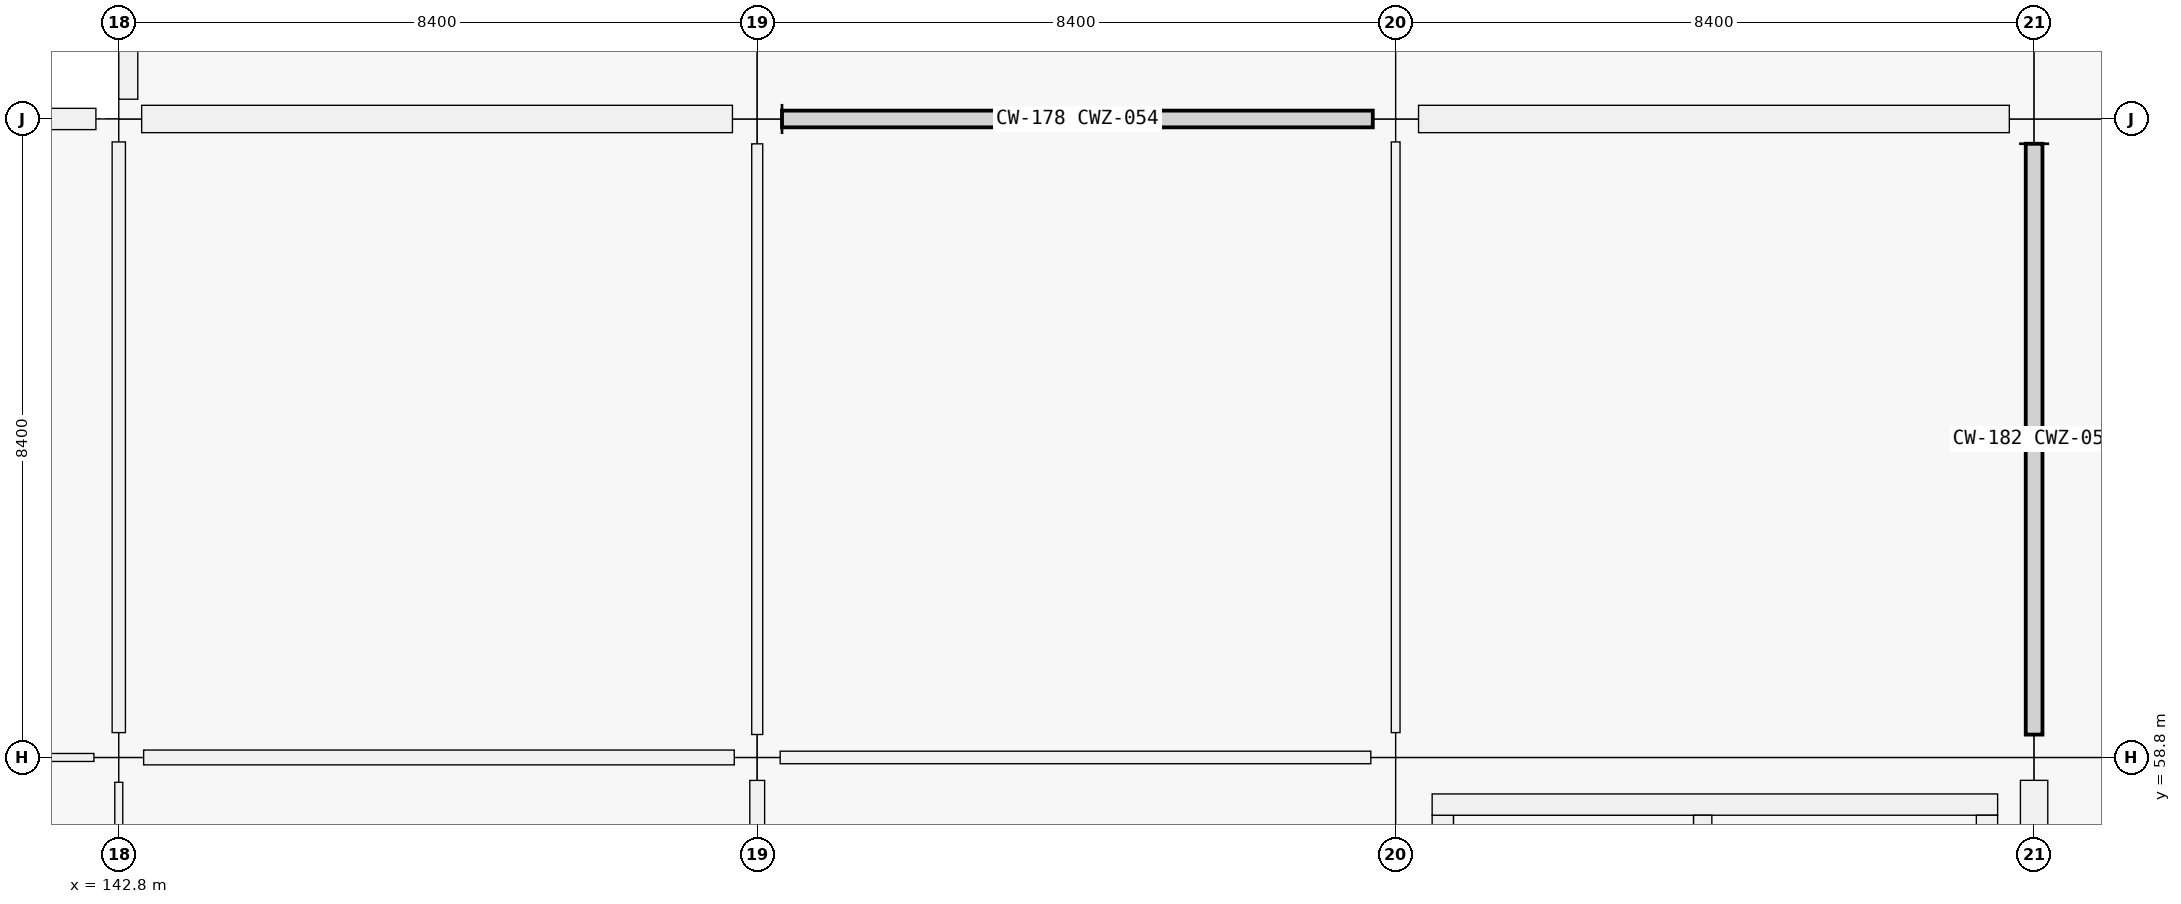
"""IFC4 building model, lengths in metres.
Left out: names, types, materials, properties, quantities, classifications, styles, units other than length and angle.
Written with IfcOpenShell. Run it as: python <this file> out.ifc"""

import sys

from ifc_helpers import new_model, si_unit, direction, frame, frame_2d, origin, origin_2d, place, context, subcontext, project, spatial, rectangle, extrude, element, fill, save


model = new_model("IFC4")
c1 = context("Model", 3, precision=1e-05, world=origin(), true_north=direction((0.0, 1.0)))
c2 = subcontext(c1, "Body", "Model", "MODEL_VIEW")
j1 = project(units=[si_unit("LENGTHUNIT", "METRE"), si_unit("PLANEANGLEUNIT", "RADIAN")], contexts=[c1])
p1 = place(None, origin())
s1 = spatial("IfcSite", under=j1, at=p1, CompositionType="ELEMENT")
p2 = place(p1, origin())
s2 = spatial("IfcBuilding", under=s1, at=p2, CompositionType="ELEMENT")
p3 = place(p2, frame((0.0, 0.0, 10.26)))
s3 = spatial("IfcBuildingStorey", under=s2, at=p3, CompositionType="ELEMENT", Elevation=10.26)
p4 = place(p3, frame((142.8, 58.8, 0.0), z_axis=(0.0, 0.0, 1.0), x_axis=(1.0, 0.0, 0.0)))
e1 = element("IfcColumn", 1, at=p4, inside=s3, PredefinedType="COLUMN", context=c2, shape_type="SweptSolid", body=[
    extrude(rectangle(XDim=0.65, YDim=0.65, at=origin_2d()), origin(), (0.0, 0.0, 1.0), 4.5),
])
for number, where, z_axis, x_axis in (
    (2, (142.8, 67.2, 0.0), (0.0, 0.0, 1.0), (1.0, 0.0, 0.0)),
    (3, (151.2, 58.8, 0.0), (0.0, 0.0, 1.0), (1.0, 0.0, 0.0)),
):
    element("IfcColumn", number, at=place(p3, frame(where, z_axis=z_axis, x_axis=x_axis)), inside=s3, PredefinedType="COLUMN", context=c2, shape_type="SweptSolid", body=[
        extrude(rectangle(XDim=0.6, YDim=0.6, at=origin_2d()), origin(), (0.0, 0.0, 1.0), 4.5),
    ])
for number, where, z_axis, x_axis in (
    (4, (151.2, 67.2, 0.0), (0.0, 0.0, 1.0), (1.0, 0.0, 0.0)),
    (5, (159.6, 58.8, 0.0), (0.0, 0.0, 1.0), (1.0, 0.0, 0.0)),
):
    element("IfcColumn", number, at=place(p3, frame(where, z_axis=z_axis, x_axis=x_axis)), inside=s3, PredefinedType="COLUMN", context=c2, shape_type="SweptSolid", body=[
        extrude(rectangle(XDim=0.65, YDim=0.65, at=origin_2d()), origin(), (0.0, 0.0, 1.0), 4.5),
    ])
for number, where, z_axis, x_axis in (
    (6, (159.6, 67.2, 0.0), (0.0, 0.0, 1.0), (1.0, 0.0, 0.0)),
    (7, (168.0, 58.8, 0.0), (0.0, 0.0, 1.0), (1.0, 0.0, 0.0)),
):
    element("IfcColumn", number, at=place(p3, frame(where, z_axis=z_axis, x_axis=x_axis)), inside=s3, PredefinedType="COLUMN", context=c2, shape_type="SweptSolid", body=[
        extrude(rectangle(XDim=0.6, YDim=0.6, at=origin_2d()), origin(), (0.0, 0.0, 1.0), 4.5),
    ])
p5 = place(p3, frame((168.0, 67.2, 0.0), z_axis=(0.0, 0.0, 1.0), x_axis=(1.0, 0.0, 0.0)))
e8 = element("IfcColumn", 8, at=p5, inside=s3, PredefinedType="COLUMN", context=c2, shape_type="SweptSolid", body=[
    extrude(rectangle(XDim=0.65, YDim=0.65, at=origin_2d()), origin(), (0.0, 0.0, 1.0), 4.5),
])
p6 = place(p3, frame((134.676, 67.2, 0.0), z_axis=(0.0, 0.0, 1.0), x_axis=(1.0, 0.0, 0.0)))
e9 = element("IfcWall", 9, at=p6, inside=s3, PredefinedType="SOLIDWALL", context=c2, shape_type="SweptSolid", body=[
    extrude(rectangle(XDim=7.823, YDim=0.28, at=frame_2d((3.912, 0.0))), origin(), (0.0, 0.0, 1.0), 3.54),
])
p7 = place(p6, frame((2.737, 0.0, 0.9)))
e10 = element("IfcOpeningElement", 10, at=p7, cuts=e9, PredefinedType="OPENING", context=c2, shape_type="SweptSolid", body=[
    extrude(rectangle(XDim=2.35, YDim=1.6, at=frame_2d((1.175, 0.8))), frame((0.0, 0.14, 0.0), z_axis=(0.0, -1.0, 0.0), x_axis=(1.0, 0.0, 0.0)), (0.0, 0.0, 1.0), 0.28),
])
p8 = place(p3, frame((143.101, 67.2, 0.0), z_axis=(0.0, 0.0, 1.0), x_axis=(1.0, 0.0, 0.0)))
e11 = element("IfcWall", 11, at=p8, inside=s3, PredefinedType="SOLIDWALL", context=c2, shape_type="SweptSolid", body=[
    extrude(rectangle(XDim=7.773, YDim=0.36, at=frame_2d((3.886, 0.0))), origin(), (0.0, 0.0, 1.0), 3.54),
])
p9 = place(p8, frame((2.686, 0.0, 0.9)))
e12 = element("IfcOpeningElement", 12, at=p9, cuts=e11, PredefinedType="OPENING", context=c2, shape_type="SweptSolid", body=[
    extrude(rectangle(XDim=2.4, YDim=1.8, at=frame_2d((1.2, 0.9))), frame((0.0, 0.18, 0.0), z_axis=(0.0, -1.0, 0.0), x_axis=(1.0, 0.0, 0.0)), (0.0, 0.0, 1.0), 0.36),
])
p10 = place(p3, frame((168.0, 58.499, 0.0), z_axis=(0.0, 0.0, 1.0), x_axis=(0.0, -1.0, 0.0)))
e13 = element("IfcWall", 13, at=p10, inside=s3, PredefinedType="SOLIDWALL", context=c2, shape_type="SweptSolid", body=[
    extrude(rectangle(XDim=7.773, YDim=0.36, at=frame_2d((3.886, 0.0))), origin(), (0.0, 0.0, 1.0), 3.54),
])
p11 = place(p3, frame((159.901, 67.2, 0.0), z_axis=(0.0, 0.0, 1.0), x_axis=(1.0, 0.0, 0.0)))
e14 = element("IfcWall", 14, at=p11, inside=s3, PredefinedType="SOLIDWALL", context=c2, shape_type="SweptSolid", body=[
    extrude(rectangle(XDim=7.773, YDim=0.36, at=frame_2d((3.887, 0.0))), origin(), (0.0, 0.0, 1.0), 3.54),
])
p12 = place(p11, frame((3.286, 0.0, 0.9)))
e15 = element("IfcOpeningElement", 15, at=p12, cuts=e14, PredefinedType="OPENING", context=c2, shape_type="SweptSolid", body=[
    extrude(rectangle(XDim=1.2, YDim=2.1, at=frame_2d((0.6, 1.05))), frame((0.0, 0.18, 0.0), z_axis=(0.0, -1.0, 0.0), x_axis=(1.0, 0.0, 0.0)), (0.0, 0.0, 1.0), 0.36),
])
p13 = place(p3, frame((142.925, 67.46, 0.0), z_axis=(0.0, 0.0, 1.0), x_axis=(0.0, 1.0, 0.0)))
e16 = element("IfcWall", 16, at=p13, inside=s3, PredefinedType="PARAPET", context=c2, shape_type="SweptSolid", body=[
    extrude(rectangle(XDim=7.88, YDim=0.25, at=frame_2d((3.94, 0.0))), origin(), (0.0, 0.0, 1.0), 0.95),
])
p14 = place(p3, frame((160.22, 51.16, 0.0), z_axis=(0.0, 0.0, 1.0), x_axis=(0.0, 1.0, 0.0)))
e17 = element("IfcWall", 17, at=p14, inside=s3, PredefinedType="SHEAR", context=c2, shape_type="SweptSolid", body=[
    extrude(rectangle(XDim=6.88, YDim=0.28, at=frame_2d((3.44, 0.0))), origin(), (0.0, 0.0, 1.0), 4.5),
])
p15 = place(p3, frame((160.08, 58.18, 0.0), z_axis=(0.0, 0.0, 1.0), x_axis=(1.0, 0.0, 0.0)))
e18 = element("IfcWall", 18, at=p15, inside=s3, PredefinedType="SHEAR", context=c2, shape_type="SweptSolid", body=[
    extrude(rectangle(XDim=7.44, YDim=0.28, at=frame_2d((3.72, 0.0))), origin(), (0.0, 0.0, 1.0), 4.5),
])
p16 = place(p3, frame((167.38, 58.04, 0.0), z_axis=(0.0, 0.0, 1.0), x_axis=(0.0, -1.0, 0.0)))
e19 = element("IfcWall", 19, at=p16, inside=s3, PredefinedType="SHEAR", context=c2, shape_type="SweptSolid", body=[
    extrude(rectangle(XDim=6.88, YDim=0.28, at=frame_2d((3.44, 0.0))), origin(), (0.0, 0.0, 1.0), 4.5),
])
p17 = place(p3, frame((163.64, 51.16, 0.0), z_axis=(0.0, 0.0, 1.0), x_axis=(0.0, 1.0, 0.0)))
e20 = element("IfcWall", 20, at=p17, inside=s3, PredefinedType="SHEAR", context=c2, shape_type="SweptSolid", body=[
    extrude(rectangle(XDim=6.88, YDim=0.24, at=frame_2d((3.44, 0.0))), origin(), (0.0, 0.0, 1.0), 4.5),
])
p18 = place(p17, frame((0.12, 0.0, 0.0)))
e21 = element("IfcOpeningElement", 21, at=p18, cuts=e20, PredefinedType="OPENING", context=c2, shape_type="SweptSolid", body=[
    extrude(rectangle(XDim=1.0, YDim=2.15, at=frame_2d((0.5, 1.075))), frame((0.0, 0.12, 0.0), z_axis=(0.0, -1.0, 0.0), x_axis=(1.0, 0.0, 0.0)), (0.0, 0.0, 1.0), 0.24),
])
p19 = place(p3, frame((134.702, 58.8, 0.0), z_axis=(0.0, 0.0, 1.0), x_axis=(1.0, 0.0, 0.0)))
e22 = element("IfcWall", 22, at=p19, inside=s3, PredefinedType="PARTITIONING", context=c2, shape_type="SweptSolid", body=[
    extrude(rectangle(XDim=7.771, YDim=0.105, at=frame_2d((3.885, 0.0))), origin(), (0.0, 0.0, 1.0), 3.37),
])
p20 = place(p19, frame((3.415, 0.0, 0.0)))
e23 = element("IfcOpeningElement", 23, at=p20, cuts=e22, PredefinedType="OPENING", context=c2, shape_type="SweptSolid", body=[
    extrude(rectangle(XDim=0.94, YDim=2.15, at=frame_2d((0.47, 1.075))), frame((0.0, 0.052, 0.0), z_axis=(0.0, -1.0, 0.0), x_axis=(1.0, 0.0, 0.0)), (0.0, 0.0, 1.0), 0.105),
])
p21 = place(p3, frame((143.127, 58.8, 0.0), z_axis=(0.0, 0.0, 1.0), x_axis=(1.0, 0.0, 0.0)))
e24 = element("IfcWall", 24, at=p21, inside=s3, PredefinedType="PARTITIONING", context=c2, shape_type="SweptSolid", body=[
    extrude(rectangle(XDim=7.771, YDim=0.195, at=frame_2d((3.885, 0.0))), origin(), (0.0, 0.0, 1.0), 3.37),
])
p22 = place(p3, frame((151.502, 58.8, 0.0), z_axis=(0.0, 0.0, 1.0), x_axis=(1.0, 0.0, 0.0)))
e25 = element("IfcWall", 25, at=p22, inside=s3, PredefinedType="PARTITIONING", context=c2, shape_type="SweptSolid", body=[
    extrude(rectangle(XDim=7.771, YDim=0.165, at=frame_2d((3.885, 0.0))), origin(), (0.0, 0.0, 1.0), 3.37),
])
p23 = place(p22, frame((3.415, 0.0, 0.0)))
e26 = element("IfcOpeningElement", 26, at=p23, cuts=e25, PredefinedType="OPENING", context=c2, shape_type="SweptSolid", body=[
    extrude(rectangle(XDim=0.94, YDim=2.15, at=frame_2d((0.47, 1.075))), frame((0.0, 0.083, 0.0), z_axis=(0.0, -1.0, 0.0), x_axis=(1.0, 0.0, 0.0)), (0.0, 0.0, 1.0), 0.165),
])
p24 = place(p3, frame((142.8, 50.702, 0.0), z_axis=(0.0, 0.0, 1.0), x_axis=(0.0, 1.0, 0.0)))
e27 = element("IfcWall", 27, at=p24, inside=s3, PredefinedType="PARTITIONING", context=c2, shape_type="SweptSolid", body=[
    extrude(rectangle(XDim=7.771, YDim=0.105, at=frame_2d((3.885, 0.0))), origin(), (0.0, 0.0, 1.0), 3.37),
])
p25 = place(p24, frame((0.673, 0.0, 0.0)))
e28 = element("IfcOpeningElement", 28, at=p25, cuts=e27, PredefinedType="OPENING", context=c2, shape_type="SweptSolid", body=[
    extrude(rectangle(XDim=0.98, YDim=2.08, at=frame_2d((0.49, 1.04))), frame((0.0, 0.052, 0.0), z_axis=(0.0, -1.0, 0.0), x_axis=(1.0, 0.0, 0.0)), (0.0, 0.0, 1.0), 0.105),
])
p26 = place(p24, frame((4.613, 0.0, 0.0)))
e29 = element("IfcOpeningElement", 29, at=p26, cuts=e27, PredefinedType="OPENING", context=c2, shape_type="SweptSolid", body=[
    extrude(rectangle(XDim=0.94, YDim=2.08, at=frame_2d((0.47, 1.04))), frame((0.0, 0.052, 0.0), z_axis=(0.0, -1.0, 0.0), x_axis=(1.0, 0.0, 0.0)), (0.0, 0.0, 1.0), 0.105),
])
p27 = place(p3, frame((142.8, 59.127, 0.0), z_axis=(0.0, 0.0, 1.0), x_axis=(0.0, 1.0, 0.0)))
e30 = element("IfcWall", 30, at=p27, inside=s3, PredefinedType="PARTITIONING", context=c2, shape_type="SweptSolid", body=[
    extrude(rectangle(XDim=7.771, YDim=0.175, at=frame_2d((3.885, 0.0))), origin(), (0.0, 0.0, 1.0), 3.37),
])
p28 = place(p27, frame((3.345, 0.0, 0.0)))
e31 = element("IfcOpeningElement", 31, at=p28, cuts=e30, PredefinedType="OPENING", context=c2, shape_type="SweptSolid", body=[
    extrude(rectangle(XDim=1.08, YDim=2.25, at=frame_2d((0.54, 1.125))), frame((0.0, 0.087, 0.0), z_axis=(0.0, -1.0, 0.0), x_axis=(1.0, 0.0, 0.0)), (0.0, 0.0, 1.0), 0.175),
])
p29 = place(p3, frame((151.2, 50.727, 0.0), z_axis=(0.0, 0.0, 1.0), x_axis=(0.0, 1.0, 0.0)))
e32 = element("IfcWall", 32, at=p29, inside=s3, PredefinedType="PARTITIONING", context=c2, shape_type="SweptSolid", body=[
    extrude(rectangle(XDim=7.771, YDim=0.195, at=frame_2d((3.885, 0.0))), origin(), (0.0, 0.0, 1.0), 3.37),
])
p30 = place(p3, frame((151.2, 59.102, 0.0), z_axis=(0.0, 0.0, 1.0), x_axis=(0.0, 1.0, 0.0)))
e33 = element("IfcWall", 33, at=p30, inside=s3, PredefinedType="PARTITIONING", context=c2, shape_type="SweptSolid", body=[
    extrude(rectangle(XDim=7.771, YDim=0.145, at=frame_2d((3.885, 0.0))), origin(), (0.0, 0.0, 1.0), 3.37),
])
p31 = place(p30, frame((3.401, 0.0, 0.0)))
e34 = element("IfcOpeningElement", 34, at=p31, cuts=e33, PredefinedType="OPENING", context=c2, shape_type="SweptSolid", body=[
    extrude(rectangle(XDim=0.97, YDim=2.12, at=frame_2d((0.485, 1.06))), frame((0.0, 0.073, 0.0), z_axis=(0.0, -1.0, 0.0), x_axis=(1.0, 0.0, 0.0)), (0.0, 0.0, 1.0), 0.145),
])
p32 = place(p3, frame((159.6, 59.127, 0.0), z_axis=(0.0, 0.0, 1.0), x_axis=(0.0, 1.0, 0.0)))
e35 = element("IfcWall", 35, at=p32, inside=s3, PredefinedType="PARTITIONING", context=c2, shape_type="SweptSolid", body=[
    extrude(rectangle(XDim=7.771, YDim=0.115, at=frame_2d((3.885, 0.0))), origin(), (0.0, 0.0, 1.0), 3.37),
])
p33 = place(p32, frame((3.365, 0.0, 0.0)))
e36 = element("IfcOpeningElement", 36, at=p33, cuts=e35, PredefinedType="OPENING", context=c2, shape_type="SweptSolid", body=[
    extrude(rectangle(XDim=1.04, YDim=2.2, at=frame_2d((0.52, 1.1))), frame((0.0, 0.058, 0.0), z_axis=(0.0, -1.0, 0.0), x_axis=(1.0, 0.0, 0.0)), (0.0, 0.0, 1.0), 0.115),
])
p34 = place(p9, origin())
e37 = element("IfcWindow", 37, at=p34, inside=s3, PartitioningType="SINGLE_PANEL", PredefinedType="WINDOW", context=c2, shape_type="SweptSolid", body=[
    extrude(rectangle(XDim=2.4, YDim=1.8, at=frame_2d((1.2, 0.9))), frame((0.0, 0.03, 0.0), z_axis=(0.0, -1.0, 0.0), x_axis=(1.0, 0.0, 0.0)), (0.0, 0.0, 1.0), 0.06),
])
fill(e12, e37)
p35 = place(p12, origin())
e38 = element("IfcWindow", 38, at=p35, inside=s3, PartitioningType="SINGLE_PANEL", PredefinedType="WINDOW", context=c2, shape_type="SweptSolid", body=[
    extrude(rectangle(XDim=1.2, YDim=2.1, at=frame_2d((0.6, 1.05))), frame((0.0, 0.03, 0.0), z_axis=(0.0, -1.0, 0.0), x_axis=(1.0, 0.0, 0.0)), (0.0, 0.0, 1.0), 0.06),
])
fill(e15, e38)
p36 = place(p23, origin())
e39 = element("IfcDoor", 39, at=p36, inside=s3, OperationType="SINGLE_SWING_LEFT", PredefinedType="DOOR", context=c2, shape_type="SweptSolid", body=[
    extrude(rectangle(XDim=0.94, YDim=2.15, at=frame_2d((0.47, 1.075))), frame((0.0, 0.025, 0.0), z_axis=(0.0, -1.0, 0.0), x_axis=(1.0, 0.0, 0.0)), (0.0, 0.0, 1.0), 0.05),
])
fill(e26, e39)
p37 = place(p28, origin())
e40 = element("IfcDoor", 40, at=p37, inside=s3, OperationType="SINGLE_SWING_LEFT", PredefinedType="DOOR", context=c2, shape_type="SweptSolid", body=[
    extrude(rectangle(XDim=1.08, YDim=2.25, at=frame_2d((0.54, 1.125))), frame((0.0, 0.025, 0.0), z_axis=(0.0, -1.0, 0.0), x_axis=(1.0, 0.0, 0.0)), (0.0, 0.0, 1.0), 0.05),
])
fill(e31, e40)
p38 = place(p33, origin())
e41 = element("IfcDoor", 41, at=p38, inside=s3, OperationType="SINGLE_SWING_LEFT", PredefinedType="DOOR", context=c2, shape_type="SweptSolid", body=[
    extrude(rectangle(XDim=1.04, YDim=2.2, at=frame_2d((0.52, 1.1))), frame((0.0, 0.025, 0.0), z_axis=(0.0, -1.0, 0.0), x_axis=(1.0, 0.0, 0.0)), (0.0, 0.0, 1.0), 0.05),
])
fill(e36, e41)
p39 = place(p31, origin())
e42 = element("IfcDoor", 42, at=p39, inside=s3, OperationType="SINGLE_SWING_LEFT", PredefinedType="DOOR", context=c2, shape_type="SweptSolid", body=[
    extrude(rectangle(XDim=0.97, YDim=2.12, at=frame_2d((0.485, 1.06))), frame((0.0, 0.025, 0.0), z_axis=(0.0, -1.0, 0.0), x_axis=(1.0, 0.0, 0.0)), (0.0, 0.0, 1.0), 0.05),
])
fill(e34, e42)
save(model, sys.argv[1])
